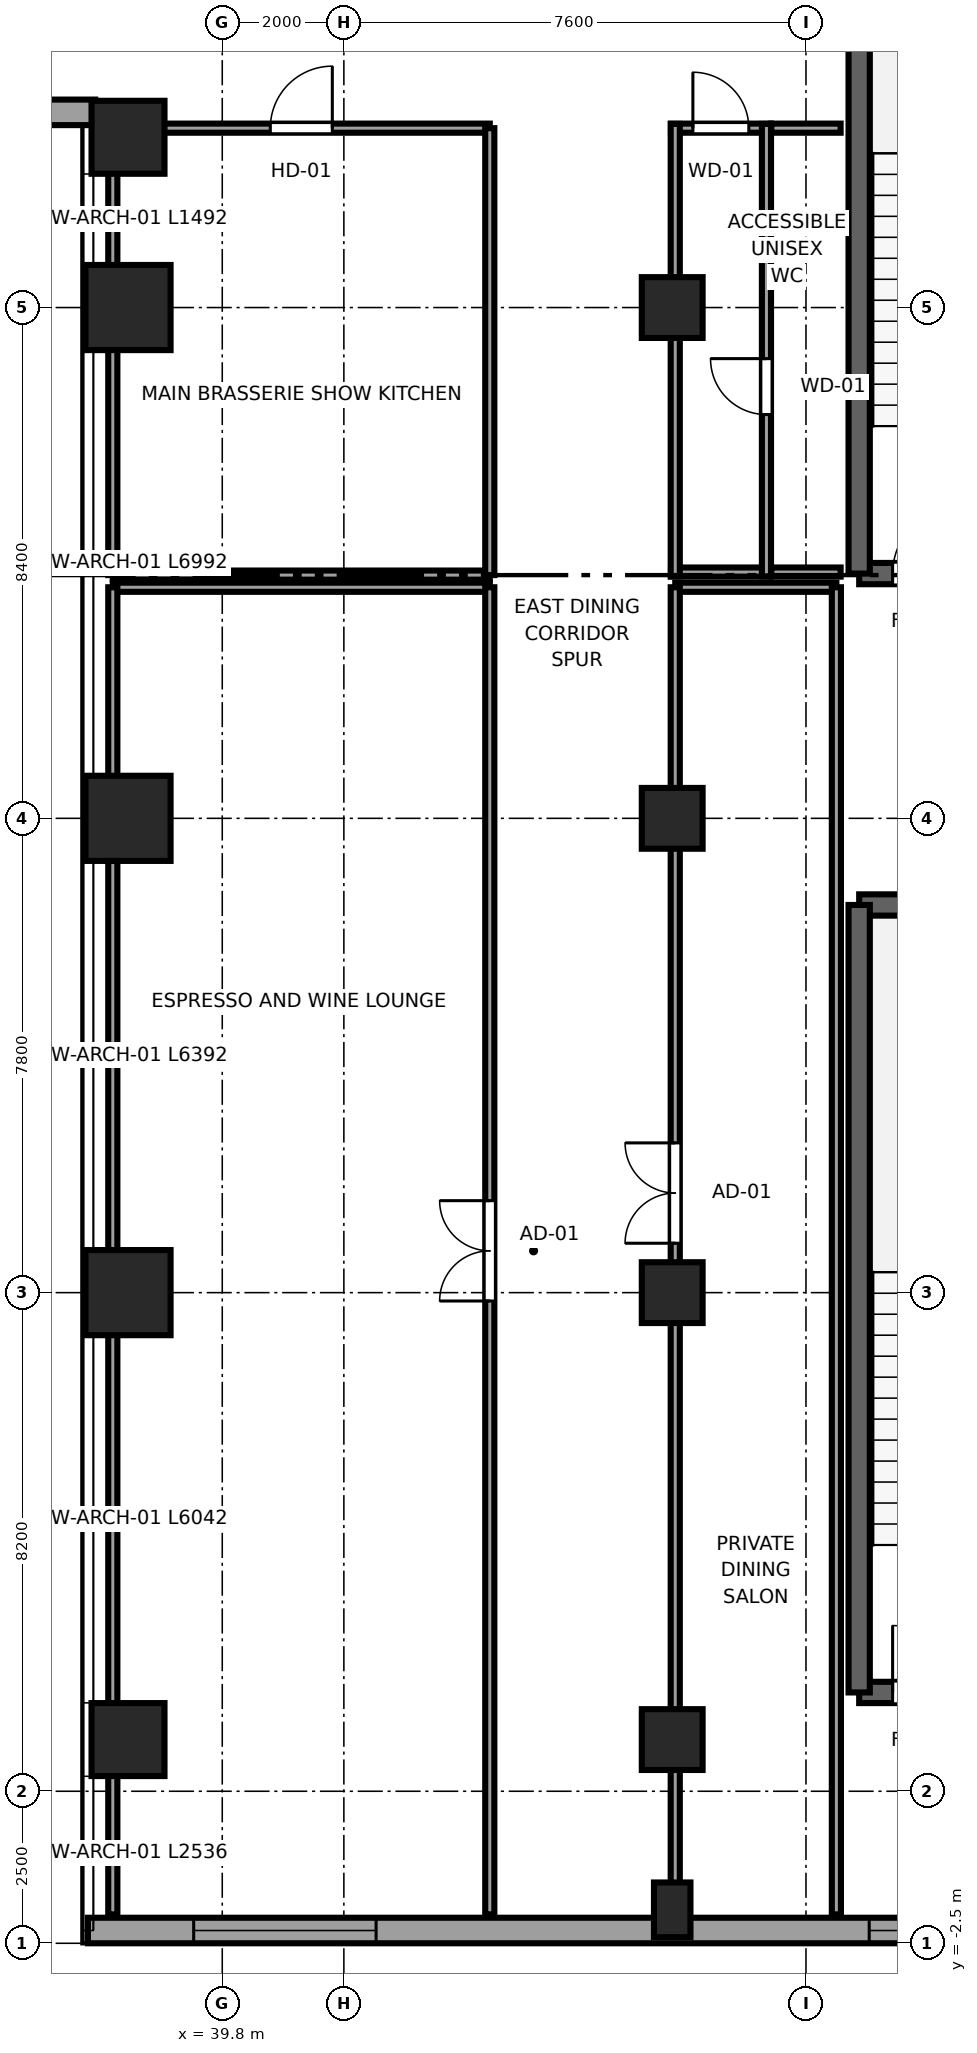
"""IFC4 building model, lengths in metres.
Left out: names, types, materials, properties, quantities, classifications, styles, units other than length and angle.
Written with IfcOpenShell. Run it as: python <this file> out.ifc"""

import sys

from ifc_helpers import new_model, si_unit, direction, frame, frame_2d, origin, origin_2d, place, context, subcontext, project, spatial, rectangle, circle, extrude, source, transform, mapped, element, fill, save


model = new_model("IFC4")
c1 = context("Model", 3, precision=1e-05, world=origin(), true_north=direction((0.0, 1.0)))
c2 = subcontext(c1, "Body", "Model", "MODEL_VIEW")
j1 = project(units=[si_unit("LENGTHUNIT", "METRE"), si_unit("PLANEANGLEUNIT", "RADIAN")], contexts=[c1])
p1 = place(None, origin())
s1 = spatial("IfcSite", under=j1, at=p1, CompositionType="ELEMENT")
p2 = place(p1, origin())
s2 = spatial("IfcBuilding", under=s1, at=p2, CompositionType="ELEMENT")
p3 = place(p2, frame((0.0, 0.0, 6.0)))
s3 = spatial("IfcBuildingStorey", under=s2, at=p3, CompositionType="ELEMENT", Elevation=6.0)
p4 = place(p3, frame((50.275, 1.625, 0.0), z_axis=(0.0, 0.0, 1.0), x_axis=(1.0, 0.0, 0.0)))
e1 = element("IfcWall", 1, at=p4, inside=s3, PredefinedType="SHEAR", context=c2, shape_type="SweptSolid", body=[
    extrude(rectangle(XDim=5.0, YDim=0.35, at=frame_2d((2.5, 0.0))), origin(), (0.0, 0.0, 1.0), 5.0),
])
p5 = place(p4, frame((0.55, 0.0, 0.0)))
e2 = element("IfcOpeningElement", 2, at=p5, cuts=e1, PredefinedType="OPENING", context=c2, shape_type="SweptSolid", body=[
    extrude(rectangle(XDim=1.1, YDim=2.12, at=frame_2d((0.55, 1.06))), frame((0.0, 0.185, 0.0), z_axis=(0.0, -1.0, 0.0), x_axis=(1.0, 0.0, 0.0)), (0.0, 0.0, 1.0), 0.37),
])
p6 = place(p3, frame((55.275, 14.575, 0.0), z_axis=(0.0, 0.0, 1.0), x_axis=(-1.0, 0.0, 0.0)))
e3 = element("IfcWall", 3, at=p6, inside=s3, PredefinedType="SHEAR", context=c2, shape_type="SweptSolid", body=[
    extrude(rectangle(XDim=5.0, YDim=0.35, at=frame_2d((2.5, 0.0))), origin(), (0.0, 0.0, 1.0), 5.0),
])
p7 = place(p3, frame((50.275, 14.575, 0.0), z_axis=(0.0, 0.0, 1.0), x_axis=(0.0, -1.0, 0.0)))
e4 = element("IfcWall", 4, at=p7, inside=s3, PredefinedType="SHEAR", context=c2, shape_type="SweptSolid", body=[
    extrude(rectangle(XDim=12.95, YDim=0.35, at=frame_2d((6.475, 0.0))), origin(), (0.0, 0.0, 1.0), 5.0),
])
p8 = place(p3, frame((50.275, 20.025, 0.0), z_axis=(0.0, 0.0, 1.0), x_axis=(1.0, 0.0, 0.0)))
e5 = element("IfcWall", 5, at=p8, inside=s3, PredefinedType="SHEAR", context=c2, shape_type="SweptSolid", body=[
    extrude(rectangle(XDim=5.0, YDim=0.35, at=frame_2d((2.5, 0.0))), origin(), (0.0, 0.0, 1.0), 5.0),
])
p9 = place(p8, frame((0.55, 0.0, 0.0)))
e6 = element("IfcOpeningElement", 6, at=p9, cuts=e5, PredefinedType="OPENING", context=c2, shape_type="SweptSolid", body=[
    extrude(rectangle(XDim=1.1, YDim=2.12, at=frame_2d((0.55, 1.06))), frame((0.0, 0.185, 0.0), z_axis=(0.0, -1.0, 0.0), x_axis=(1.0, 0.0, 0.0)), (0.0, 0.0, 1.0), 0.37),
])
p10 = place(p3, frame((50.275, 32.975, 0.0), z_axis=(0.0, 0.0, 1.0), x_axis=(0.0, -1.0, 0.0)))
e7 = element("IfcWall", 7, at=p10, inside=s3, PredefinedType="SHEAR", context=c2, shape_type="SweptSolid", body=[
    extrude(rectangle(XDim=12.95, YDim=0.35, at=frame_2d((6.475, 0.0))), origin(), (0.0, 0.0, 1.0), 5.0),
])
m1 = source(origin(), c2, "Body", "SweptSolid", [
    extrude(circle(Radius=0.6, at=origin_2d()), origin(), (0.0, 0.0, 1.0), 5.0),
])
p11 = place(p3, frame((38.25, 0.85, 0.0), z_axis=(0.0, 0.0, 1.0), x_axis=(1.0, 0.0, 0.0)))
e8 = element("IfcColumn", 8, at=p11, inside=s3, PredefinedType="COLUMN", context=c2, shape_type="MappedRepresentation", body=[
    mapped(m1, transform((0.0, 0.0, 0.0), x_axis=(1.0, 0.0, 0.0), y_axis=(0.0, 1.0, 0.0), z_axis=(0.0, 0.0, 1.0), scale=1.0)),
])
m2 = source(origin(), c2, "Body", "SweptSolid", [
    extrude(rectangle(XDim=1.4, YDim=1.4, at=origin_2d()), origin(), (0.0, 0.0, 1.0), 5.0),
])
for number, where, z_axis, x_axis in (
    (9, (38.25, 8.2, 0.0), (0.0, 0.0, 1.0), (1.0, 0.0, 0.0)),
    (10, (38.25, 16.0, 0.0), (0.0, 0.0, 1.0), (1.0, 0.0, 0.0)),
    (11, (38.25, 24.4, 0.0), (0.0, 0.0, 1.0), (1.0, 0.0, 0.0)),
):
    element("IfcColumn", number, at=place(p3, frame(where, z_axis=z_axis, x_axis=x_axis)), inside=s3, PredefinedType="COLUMN", context=c2, shape_type="MappedRepresentation", body=[
        mapped(m2, transform((0.0, 0.0, 0.0), x_axis=(1.0, 0.0, 0.0), y_axis=(0.0, 1.0, 0.0), z_axis=(0.0, 0.0, 1.0), scale=1.0)),
    ])
p12 = place(p3, frame((38.25, 27.2, 0.0), z_axis=(0.0, 0.0, 1.0), x_axis=(1.0, 0.0, 0.0)))
e12 = element("IfcColumn", 12, at=p12, inside=s3, PredefinedType="COLUMN", context=c2, shape_type="MappedRepresentation", body=[
    mapped(m1, transform((0.0, 0.0, 0.0), x_axis=(1.0, 0.0, 0.0), y_axis=(0.0, 1.0, 0.0), z_axis=(0.0, 0.0, 1.0), scale=1.0)),
])
m3 = source(origin(), c2, "Body", "SweptSolid", [
    extrude(rectangle(XDim=1.0, YDim=1.0, at=origin_2d()), origin(), (0.0, 0.0, 1.0), 5.0),
])
for number, where, z_axis, x_axis in (
    (13, (47.2, 0.85, 0.0), (0.0, 0.0, 1.0), (1.0, 0.0, 0.0)),
    (14, (47.2, 8.2, 0.0), (0.0, 0.0, 1.0), (1.0, 0.0, 0.0)),
    (15, (47.2, 16.0, 0.0), (0.0, 0.0, 1.0), (1.0, 0.0, 0.0)),
    (16, (47.2, 24.4, 0.0), (0.0, 0.0, 1.0), (1.0, 0.0, 0.0)),
):
    element("IfcColumn", number, at=place(p3, frame(where, z_axis=z_axis, x_axis=x_axis)), inside=s3, PredefinedType="COLUMN", context=c2, shape_type="MappedRepresentation", body=[
        mapped(m3, transform((0.0, 0.0, 0.0), x_axis=(1.0, 0.0, 0.0), y_axis=(0.0, 1.0, 0.0), z_axis=(0.0, 0.0, 1.0), scale=1.0)),
    ])
m4 = source(origin(), c2, "Body", "SweptSolid", [
    extrude(rectangle(XDim=0.6, YDim=0.9, at=origin_2d()), origin(), (0.0, 0.0, 1.0), 5.0),
])
p13 = place(p3, frame((47.2, -1.95, 0.0), z_axis=(0.0, 0.0, 1.0), x_axis=(1.0, 0.0, 0.0)))
e17 = element("IfcColumn", 17, at=p13, inside=s3, PredefinedType="PILASTER", context=c2, shape_type="MappedRepresentation", body=[
    mapped(m4, transform((0.0, 0.0, 0.0), x_axis=(1.0, 0.0, 0.0), y_axis=(0.0, 1.0, 0.0), z_axis=(0.0, 0.0, 1.0), scale=1.0)),
])
p14 = place(p3, frame((19.29, 27.61, 0.0), z_axis=(0.0, 0.0, 1.0), x_axis=(1.0, 0.0, 0.0)))
e18 = element("IfcWall", 18, at=p14, inside=s3, PredefinedType="SOLIDWALL", context=c2, shape_type="SweptSolid", body=[
    extrude(rectangle(XDim=18.42, YDim=0.42, at=frame_2d((9.21, 0.0))), origin(), (0.0, 0.0, 1.0), 4.74),
])
p15 = place(p14, frame((1.97, 0.0, 0.65)))
e19 = element("IfcOpeningElement", 19, at=p15, cuts=e18, PredefinedType="OPENING", context=c2, shape_type="SweptSolid", body=[
    extrude(rectangle(XDim=3.0, YDim=2.5, at=frame_2d((1.5, 1.25))), frame((0.0, 0.22, 0.0), z_axis=(0.0, -1.0, 0.0), x_axis=(1.0, 0.0, 0.0)), (0.0, 0.0, 1.0), 0.44),
])
p16 = place(p14, frame((7.71, 0.0, 0.65)))
e20 = element("IfcOpeningElement", 20, at=p16, cuts=e18, PredefinedType="OPENING", context=c2, shape_type="SweptSolid", body=[
    extrude(rectangle(XDim=3.0, YDim=2.5, at=frame_2d((1.5, 1.25))), frame((0.0, 0.22, 0.0), z_axis=(0.0, -1.0, 0.0), x_axis=(1.0, 0.0, 0.0)), (0.0, 0.0, 1.0), 0.44),
])
p17 = place(p14, frame((13.45, 0.0, 0.65)))
e21 = element("IfcOpeningElement", 21, at=p17, cuts=e18, PredefinedType="OPENING", context=c2, shape_type="SweptSolid", body=[
    extrude(rectangle(XDim=3.0, YDim=2.5, at=frame_2d((1.5, 1.25))), frame((0.0, 0.22, 0.0), z_axis=(0.0, -1.0, 0.0), x_axis=(1.0, 0.0, 0.0)), (0.0, 0.0, 1.0), 0.44),
])
p18 = place(p3, frame((37.59, -2.29, 0.0), z_axis=(0.0, 0.0, 1.0), x_axis=(1.0, 0.0, 0.0)))
e22 = element("IfcWall", 22, at=p18, inside=s3, PredefinedType="SOLIDWALL", context=c2, shape_type="SweptSolid", body=[
    extrude(rectangle(XDim=27.6, YDim=0.42, at=frame_2d((13.8, 0.0))), origin(), (0.0, 0.0, 1.0), 4.74),
])
p19 = place(p18, frame((1.74, 0.0, 0.65)))
e23 = element("IfcOpeningElement", 23, at=p19, cuts=e22, PredefinedType="OPENING", context=c2, shape_type="SweptSolid", body=[
    extrude(rectangle(XDim=3.0, YDim=2.5, at=frame_2d((1.5, 1.25))), frame((0.0, 0.22, 0.0), z_axis=(0.0, -1.0, 0.0), x_axis=(1.0, 0.0, 0.0)), (0.0, 0.0, 1.0), 0.44),
])
p20 = place(p18, frame((12.85, 0.0, 0.65)))
e24 = element("IfcOpeningElement", 24, at=p20, cuts=e22, PredefinedType="OPENING", context=c2, shape_type="SweptSolid", body=[
    extrude(rectangle(XDim=3.0, YDim=2.5, at=frame_2d((1.5, 1.25))), frame((0.0, 0.22, 0.0), z_axis=(0.0, -1.0, 0.0), x_axis=(1.0, 0.0, 0.0)), (0.0, 0.0, 1.0), 0.44),
])
p21 = place(p18, frame((22.86, 0.0, 0.65)))
e25 = element("IfcOpeningElement", 25, at=p21, cuts=e22, PredefinedType="OPENING", context=c2, shape_type="SweptSolid", body=[
    extrude(rectangle(XDim=3.0, YDim=2.5, at=frame_2d((1.5, 1.25))), frame((0.0, 0.22, 0.0), z_axis=(0.0, -1.0, 0.0), x_axis=(1.0, 0.0, 0.0)), (0.0, 0.0, 1.0), 0.44),
])
p22 = place(p3, frame((38.0, 19.8, 0.0), z_axis=(0.0, 0.0, 1.0), x_axis=(1.0, 0.0, 0.0)))
e26 = element("IfcWall", 26, at=p22, inside=s3, PredefinedType="PARTITIONING", context=c2, shape_type="SweptSolid", body=[
    extrude(rectangle(XDim=6.2, YDim=0.15, at=frame_2d((3.1, 0.0))), origin(), (0.0, 0.0, 1.0), 4.74),
])
p23 = place(p3, frame((38.0, -2.025, 0.0), z_axis=(0.0, 0.0, 1.0), x_axis=(0.0, 1.0, 0.0)))
e27 = element("IfcWall", 27, at=p23, inside=s3, PredefinedType="PARTITIONING", context=c2, shape_type="SweptSolid", body=[
    extrude(rectangle(XDim=21.825, YDim=0.15, at=frame_2d((10.913, 0.0))), origin(), (0.0, 0.0, 1.0), 4.74),
])
p24 = place(p3, frame((44.2, -2.025, 0.0), z_axis=(0.0, 0.0, 1.0), x_axis=(0.0, 1.0, 0.0)))
e28 = element("IfcWall", 28, at=p24, inside=s3, PredefinedType="PARTITIONING", context=c2, shape_type="SweptSolid", body=[
    extrude(rectangle(XDim=21.825, YDim=0.15, at=frame_2d((10.913, 0.0))), origin(), (0.0, 0.0, 1.0), 4.276),
])
p25 = place(p24, frame((10.087, 0.0, 0.0)))
e29 = element("IfcOpeningElement", 29, at=p25, cuts=e28, PredefinedType="OPENING", context=c2, shape_type="SweptSolid", body=[
    extrude(rectangle(XDim=1.65, YDim=2.15, at=frame_2d((0.825, 1.075))), frame((0.0, 0.085, 0.0), z_axis=(0.0, -1.0, 0.0), x_axis=(1.0, 0.0, 0.0)), (0.0, 0.0, 1.0), 0.17),
])
p26 = place(p3, frame((38.0, 20.0, 0.0), z_axis=(0.0, 0.0, 1.0), x_axis=(1.0, 0.0, 0.0)))
e30 = element("IfcWall", 30, at=p26, inside=s3, PredefinedType="PARTITIONING", context=c2, shape_type="SweptSolid", body=[
    extrude(rectangle(XDim=6.2, YDim=0.15, at=frame_2d((3.1, 0.0))), origin(), (0.0, 0.0, 1.0), 4.74),
])
p27 = place(p3, frame((38.0, 27.35, 0.0), z_axis=(0.0, 0.0, 1.0), x_axis=(1.0, 0.0, 0.0)))
e31 = element("IfcWall", 31, at=p27, inside=s3, PredefinedType="PARTITIONING", context=c2, shape_type="SweptSolid", body=[
    extrude(rectangle(XDim=6.2, YDim=0.15, at=frame_2d((3.1, 0.0))), origin(), (0.0, 0.0, 1.0), 4.74),
])
p28 = place(p27, frame((2.59, 0.0, 0.0)))
e32 = element("IfcOpeningElement", 32, at=p28, cuts=e31, PredefinedType="OPENING", context=c2, shape_type="SweptSolid", body=[
    extrude(rectangle(XDim=1.02, YDim=2.03, at=frame_2d((0.51, 1.015))), frame((0.0, 0.085, 0.0), z_axis=(0.0, -1.0, 0.0), x_axis=(1.0, 0.0, 0.0)), (0.0, 0.0, 1.0), 0.17),
])
p29 = place(p3, frame((38.0, 20.0, 0.0), z_axis=(0.0, 0.0, 1.0), x_axis=(0.0, 1.0, 0.0)))
e33 = element("IfcWall", 33, at=p29, inside=s3, PredefinedType="PARTITIONING", context=c2, shape_type="SweptSolid", body=[
    extrude(rectangle(XDim=7.4, YDim=0.15, at=frame_2d((3.7, 0.0))), origin(), (0.0, 0.0, 1.0), 4.74),
])
p30 = place(p3, frame((44.2, 20.0, 0.0), z_axis=(0.0, 0.0, 1.0), x_axis=(0.0, 1.0, 0.0)))
e34 = element("IfcWall", 34, at=p30, inside=s3, PredefinedType="PARTITIONING", context=c2, shape_type="SweptSolid", body=[
    extrude(rectangle(XDim=7.35, YDim=0.15, at=frame_2d((3.675, 0.0))), origin(), (0.0, 0.0, 1.0), 4.276),
])
p31 = place(p3, frame((47.25, 19.8, 0.0), z_axis=(0.0, 0.0, 1.0), x_axis=(1.0, 0.0, 0.0)))
e35 = element("IfcWall", 35, at=p31, inside=s3, PredefinedType="PARTITIONING", context=c2, shape_type="SweptSolid", body=[
    extrude(rectangle(XDim=2.65, YDim=0.15, at=frame_2d((1.325, 0.0))), origin(), (0.0, 0.0, 1.0), 4.74),
])
p32 = place(p3, frame((47.25, -2.025, 0.0), z_axis=(0.0, 0.0, 1.0), x_axis=(0.0, 1.0, 0.0)))
e36 = element("IfcWall", 36, at=p32, inside=s3, PredefinedType="PARTITIONING", context=c2, shape_type="SweptSolid", body=[
    extrude(rectangle(XDim=21.825, YDim=0.15, at=frame_2d((10.913, 0.0))), origin(), (0.0, 0.0, 1.0), 3.914),
])
p33 = place(p32, frame((11.038, 0.0, 0.0)))
e37 = element("IfcOpeningElement", 37, at=p33, cuts=e36, PredefinedType="OPENING", context=c2, shape_type="SweptSolid", body=[
    extrude(rectangle(XDim=1.65, YDim=2.15, at=frame_2d((0.825, 1.075))), frame((0.0, 0.085, 0.0), z_axis=(0.0, -1.0, 0.0), x_axis=(1.0, 0.0, 0.0)), (0.0, 0.0, 1.0), 0.17),
])
p34 = place(p3, frame((49.9, -2.025, 0.0), z_axis=(0.0, 0.0, 1.0), x_axis=(0.0, 1.0, 0.0)))
e38 = element("IfcWall", 38, at=p34, inside=s3, PredefinedType="PARTITIONING", context=c2, shape_type="SweptSolid", body=[
    extrude(rectangle(XDim=21.825, YDim=0.15, at=frame_2d((10.913, 0.0))), origin(), (0.0, 0.0, 1.0), 4.74),
])
p35 = place(p3, frame((47.18, 20.05, 0.0), z_axis=(0.0, 0.0, 1.0), x_axis=(1.0, 0.0, 0.0)))
e39 = element("IfcWall", 39, at=p35, inside=s3, PredefinedType="PARTITIONING", context=c2, shape_type="SweptSolid", body=[
    extrude(rectangle(XDim=1.64, YDim=0.15, at=frame_2d((0.82, 0.0))), origin(), (0.0, 0.0, 1.0), 4.74),
])
p36 = place(p3, frame((47.18, 27.35, 0.0), z_axis=(0.0, 0.0, 1.0), x_axis=(1.0, 0.0, 0.0)))
e40 = element("IfcWall", 40, at=p36, inside=s3, PredefinedType="PARTITIONING", context=c2, shape_type="SweptSolid", body=[
    extrude(rectangle(XDim=1.64, YDim=0.15, at=frame_2d((0.82, 0.0))), origin(), (0.0, 0.0, 1.0), 4.74),
])
p37 = place(p36, frame((0.36, 0.0, 0.0)))
e41 = element("IfcOpeningElement", 41, at=p37, cuts=e40, PredefinedType="OPENING", context=c2, shape_type="SweptSolid", body=[
    extrude(rectangle(XDim=0.92, YDim=2.01, at=frame_2d((0.46, 1.005))), frame((0.0, 0.085, 0.0), z_axis=(0.0, -1.0, 0.0), x_axis=(1.0, 0.0, 0.0)), (0.0, 0.0, 1.0), 0.17),
])
p38 = place(p3, frame((47.25, 19.98, 0.0), z_axis=(0.0, 0.0, 1.0), x_axis=(0.0, 1.0, 0.0)))
e42 = element("IfcWall", 42, at=p38, inside=s3, PredefinedType="PARTITIONING", context=c2, shape_type="SweptSolid", body=[
    extrude(rectangle(XDim=7.44, YDim=0.15, at=frame_2d((3.72, 0.0))), origin(), (0.0, 0.0, 1.0), 3.914),
])
p39 = place(p3, frame((48.75, 19.98, 0.0), z_axis=(0.0, 0.0, 1.0), x_axis=(0.0, 1.0, 0.0)))
e43 = element("IfcWall", 43, at=p39, inside=s3, PredefinedType="PARTITIONING", context=c2, shape_type="SweptSolid", body=[
    extrude(rectangle(XDim=7.44, YDim=0.15, at=frame_2d((3.72, 0.0))), origin(), (0.0, 0.0, 1.0), 4.74),
])
p40 = place(p39, frame((2.66, 0.0, 0.0)))
e44 = element("IfcOpeningElement", 44, at=p40, cuts=e43, PredefinedType="OPENING", context=c2, shape_type="SweptSolid", body=[
    extrude(rectangle(XDim=0.92, YDim=2.01, at=frame_2d((0.46, 1.005))), frame((0.0, 0.085, 0.0), z_axis=(0.0, -1.0, 0.0), x_axis=(1.0, 0.0, 0.0)), (0.0, 0.0, 1.0), 0.17),
])
for number, where, z_axis, x_axis in (
    (45, (48.83, 20.05, 0.0), (0.0, 0.0, 1.0), (1.0, 0.0, 0.0)),
    (46, (48.83, 27.35, 0.0), (0.0, 0.0, 1.0), (1.0, 0.0, 0.0)),
):
    element("IfcWall", number, at=place(p3, frame(where, z_axis=z_axis, x_axis=x_axis)), inside=s3, PredefinedType="PARTITIONING", context=c2, shape_type="SweptSolid", body=[
        extrude(rectangle(XDim=1.14, YDim=0.15, at=frame_2d((0.57, 0.0))), origin(), (0.0, 0.0, 1.0), 4.74),
    ])
m5 = source(origin(), c2, "Body", "SweptSolid", [
    extrude(rectangle(XDim=3.0, YDim=2.5, at=frame_2d((1.5, 1.25))), frame((0.0, 0.09, 0.0), z_axis=(0.0, -1.0, 0.0), x_axis=(1.0, 0.0, 0.0)), (0.0, 0.0, 1.0), 0.06),
])
p41 = place(p19, origin())
e47 = element("IfcWindow", 47, at=p41, inside=s3, PartitioningType="TRIPLE_PANEL_HORIZONTAL", PredefinedType="WINDOW", context=c2, shape_type="MappedRepresentation", body=[
    mapped(m5, transform((0.0, 0.0, 0.0), x_axis=(1.0, 0.0, 0.0), y_axis=(0.0, 1.0, 0.0), z_axis=(0.0, 0.0, 1.0), scale=1.0)),
])
fill(e23, e47)
p42 = place(p20, origin())
e48 = element("IfcWindow", 48, at=p42, inside=s3, PartitioningType="TRIPLE_PANEL_HORIZONTAL", PredefinedType="WINDOW", context=c2, shape_type="MappedRepresentation", body=[
    mapped(m5, transform((0.0, 0.0, 0.0), x_axis=(1.0, 0.0, 0.0), y_axis=(0.0, 1.0, 0.0), z_axis=(0.0, 0.0, 1.0), scale=1.0)),
])
fill(e24, e48)
m6 = source(origin(), c2, "Body", "SweptSolid", [
    extrude(rectangle(XDim=1.1, YDim=2.12, at=frame_2d((0.55, 1.06))), frame((0.0, 0.025, 0.0), z_axis=(0.0, -1.0, 0.0), x_axis=(1.0, 0.0, 0.0)), (0.0, 0.0, 1.0), 0.05),
])
p43 = place(p5, origin())
e49 = element("IfcDoor", 49, at=p43, inside=s3, OperationType="SINGLE_SWING_LEFT", PredefinedType="DOOR", context=c2, shape_type="MappedRepresentation", body=[
    mapped(m6, transform((0.0, 0.0, 0.0), x_axis=(1.0, 0.0, 0.0), y_axis=(0.0, 1.0, 0.0), z_axis=(0.0, 0.0, 1.0), scale=1.0)),
])
fill(e2, e49)
p44 = place(p9, origin())
e50 = element("IfcDoor", 50, at=p44, inside=s3, OperationType="SINGLE_SWING_RIGHT", PredefinedType="DOOR", context=c2, shape_type="MappedRepresentation", body=[
    mapped(m6, transform((0.0, 0.0, 0.0), x_axis=(1.0, 0.0, 0.0), y_axis=(0.0, 1.0, 0.0), z_axis=(0.0, 0.0, 1.0), scale=1.0)),
])
fill(e6, e50)
m7 = source(origin(), c2, "Body", "SweptSolid", [
    extrude(rectangle(XDim=1.65, YDim=2.15, at=frame_2d((0.825, 1.075))), frame((0.0, 0.025, 0.0), z_axis=(0.0, -1.0, 0.0), x_axis=(1.0, 0.0, 0.0)), (0.0, 0.0, 1.0), 0.05),
])
p45 = place(p25, origin())
e51 = element("IfcDoor", 51, at=p45, inside=s3, OperationType="DOUBLE_DOOR_SINGLE_SWING", PredefinedType="DOOR", context=c2, shape_type="MappedRepresentation", body=[
    mapped(m7, transform((0.0, 0.0, 0.0), x_axis=(1.0, 0.0, 0.0), y_axis=(0.0, 1.0, 0.0), z_axis=(0.0, 0.0, 1.0), scale=1.0)),
])
fill(e29, e51)
m8 = source(origin(), c2, "Body", "SweptSolid", [
    extrude(rectangle(XDim=1.02, YDim=2.03, at=frame_2d((0.51, 1.015))), frame((0.0, 0.025, 0.0), z_axis=(0.0, -1.0, 0.0), x_axis=(1.0, 0.0, 0.0)), (0.0, 0.0, 1.0), 0.05),
])
p46 = place(p28, origin())
e52 = element("IfcDoor", 52, at=p46, inside=s3, OperationType="SINGLE_SWING_RIGHT", PredefinedType="DOOR", context=c2, shape_type="MappedRepresentation", body=[
    mapped(m8, transform((0.0, 0.0, 0.0), x_axis=(1.0, 0.0, 0.0), y_axis=(0.0, 1.0, 0.0), z_axis=(0.0, 0.0, 1.0), scale=1.0)),
])
fill(e32, e52)
p47 = place(p33, origin())
e53 = element("IfcDoor", 53, at=p47, inside=s3, OperationType="DOUBLE_DOOR_SINGLE_SWING", PredefinedType="DOOR", context=c2, shape_type="MappedRepresentation", body=[
    mapped(m7, transform((0.0, 0.0, 0.0), x_axis=(1.0, 0.0, 0.0), y_axis=(0.0, 1.0, 0.0), z_axis=(0.0, 0.0, 1.0), scale=1.0)),
])
fill(e37, e53)
m9 = source(origin(), c2, "Body", "SweptSolid", [
    extrude(rectangle(XDim=0.92, YDim=2.01, at=frame_2d((0.46, 1.005))), frame((0.0, 0.025, 0.0), z_axis=(0.0, -1.0, 0.0), x_axis=(1.0, 0.0, 0.0)), (0.0, 0.0, 1.0), 0.05),
])
p48 = place(p37, origin())
e54 = element("IfcDoor", 54, at=p48, inside=s3, OperationType="SINGLE_SWING_LEFT", PredefinedType="DOOR", context=c2, shape_type="MappedRepresentation", body=[
    mapped(m9, transform((0.0, 0.0, 0.0), x_axis=(1.0, 0.0, 0.0), y_axis=(0.0, 1.0, 0.0), z_axis=(0.0, 0.0, 1.0), scale=1.0)),
])
fill(e41, e54)
p49 = place(p40, origin())
e55 = element("IfcDoor", 55, at=p49, inside=s3, OperationType="SINGLE_SWING_RIGHT", PredefinedType="DOOR", context=c2, shape_type="MappedRepresentation", body=[
    mapped(m9, transform((0.0, 0.0, 0.0), x_axis=(1.0, 0.0, 0.0), y_axis=(0.0, 1.0, 0.0), z_axis=(0.0, 0.0, 1.0), scale=1.0)),
])
fill(e44, e55)
save(model, sys.argv[1])
